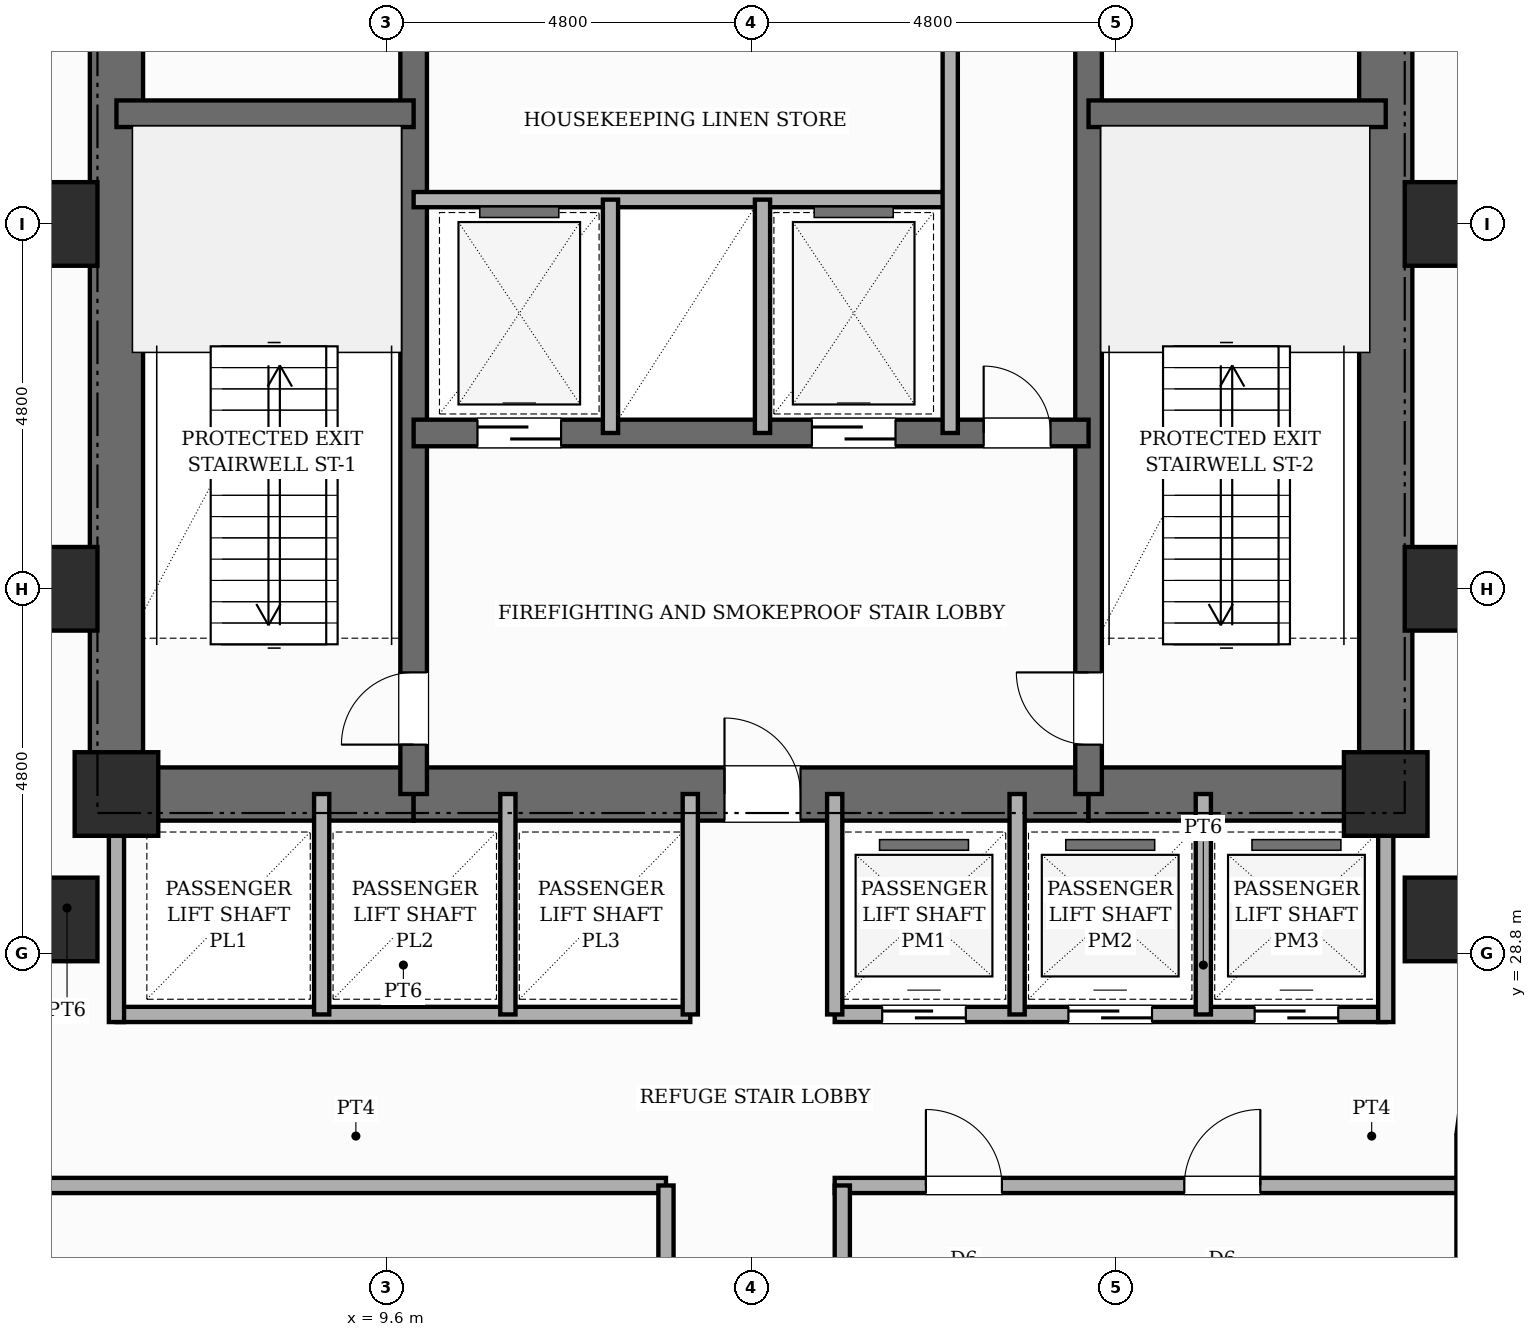
"""IFC4 building model, lengths in metres.
Left out: names, types, materials, properties, quantities, classifications, styles, units other than length and angle.
Written with IfcOpenShell. Run it as: python <this file> out.ifc"""

import sys

from ifc_helpers import new_model, si_unit, direction, frame, frame_2d, origin, origin_2d, place, context, subcontext, project, spatial, rectangle, extrude, element, fill, save


model = new_model("IFC4")
c1 = context("Model", 3, precision=1e-05, world=origin(), true_north=direction((0.0, 1.0)))
c2 = subcontext(c1, "Body", "Model", "MODEL_VIEW")
j1 = project(units=[si_unit("LENGTHUNIT", "METRE"), si_unit("PLANEANGLEUNIT", "RADIAN")], contexts=[c1])
p1 = place(None, origin())
s1 = spatial("IfcSite", under=j1, at=p1, CompositionType="ELEMENT")
p2 = place(p1, origin())
s2 = spatial("IfcBuilding", under=s1, at=p2, CompositionType="ELEMENT")
p3 = place(p2, frame((0.0, 0.0, 101.8)))
s3 = spatial("IfcBuildingStorey", under=s2, at=p3, CompositionType="ELEMENT", Elevation=101.8)
p4 = place(p3, frame((6.05, 30.55, 0.0), z_axis=(0.0, 0.0, 1.0), x_axis=(0.0, 1.0, 0.0)))
e1 = element("IfcWall", 1, at=p4, inside=s3, PredefinedType="SHEAR", context=c2, shape_type="SweptSolid", body=[
    extrude(rectangle(XDim=15.6, YDim=0.7, at=frame_2d((7.8, 0.0))), origin(), (0.0, 0.0, 1.0), 5.4),
])
p5 = place(p3, frame((22.75, 30.55, 0.0), z_axis=(0.0, 0.0, 1.0), x_axis=(0.0, 1.0, 0.0)))
e2 = element("IfcWall", 2, at=p5, inside=s3, PredefinedType="SHEAR", context=c2, shape_type="SweptSolid", body=[
    extrude(rectangle(XDim=15.6, YDim=0.7, at=frame_2d((7.8, 0.0))), origin(), (0.0, 0.0, 1.0), 5.4),
])
p6 = place(p5, frame((10.8, 0.0, 0.0)))
e3 = element("IfcOpeningElement", 3, at=p6, cuts=e2, PredefinedType="OPENING", context=c2, shape_type="SweptSolid", body=[
    extrude(rectangle(XDim=1.0, YDim=2.15, at=frame_2d((0.5, 1.075))), frame((0.0, 0.36, 0.0), z_axis=(0.0, -1.0, 0.0), x_axis=(1.0, 0.0, 0.0)), (0.0, 0.0, 1.0), 0.72),
])
p7 = place(p3, frame((6.05, 30.9, 0.0), z_axis=(0.0, 0.0, 1.0), x_axis=(1.0, 0.0, 0.0)))
e4 = element("IfcWall", 4, at=p7, inside=s3, PredefinedType="SHEAR", context=c2, shape_type="SweptSolid", body=[
    extrude(rectangle(XDim=3.91, YDim=0.7, at=frame_2d((1.955, 0.0))), origin(), (0.0, 0.0, 1.0), 5.4),
])
p8 = place(p3, frame((9.96, 30.9, 0.0), z_axis=(0.0, 0.0, 1.0), x_axis=(1.0, 0.0, 0.0)))
e5 = element("IfcWall", 5, at=p8, inside=s3, PredefinedType="SHEAR", context=c2, shape_type="SweptSolid", body=[
    extrude(rectangle(XDim=8.88, YDim=0.7, at=frame_2d((4.44, 0.0))), origin(), (0.0, 0.0, 1.0), 5.4),
])
p9 = place(p8, frame((4.09, 0.0, 0.0)))
e6 = element("IfcOpeningElement", 6, at=p9, cuts=e5, PredefinedType="OPENING", context=c2, shape_type="SweptSolid", body=[
    extrude(rectangle(XDim=1.0, YDim=2.15, at=frame_2d((0.5, 1.075))), frame((0.0, 0.36, 0.0), z_axis=(0.0, -1.0, 0.0), x_axis=(1.0, 0.0, 0.0)), (0.0, 0.0, 1.0), 0.72),
])
p10 = place(p3, frame((18.84, 30.9, 0.0), z_axis=(0.0, 0.0, 1.0), x_axis=(1.0, 0.0, 0.0)))
e7 = element("IfcWall", 7, at=p10, inside=s3, PredefinedType="SHEAR", context=c2, shape_type="SweptSolid", body=[
    extrude(rectangle(XDim=3.91, YDim=0.7, at=frame_2d((1.955, 0.0))), origin(), (0.0, 0.0, 1.0), 5.4),
])
p11 = place(p3, frame((9.96, 30.9, 0.0), z_axis=(0.0, 0.0, 1.0), x_axis=(0.0, 1.0, 0.0)))
e8 = element("IfcWall", 8, at=p11, inside=s3, PredefinedType="SHEAR", context=c2, shape_type="SweptSolid", body=[
    extrude(rectangle(XDim=14.9, YDim=0.35, at=frame_2d((7.45, 0.0))), origin(), (0.0, 0.0, 1.0), 5.4),
])
p12 = place(p11, frame((0.65, 0.0, 0.0)))
e9 = element("IfcOpeningElement", 9, at=p12, cuts=e8, PredefinedType="OPENING", context=c2, shape_type="SweptSolid", body=[
    extrude(rectangle(XDim=0.95, YDim=2.1, at=frame_2d((0.475, 1.05))), frame((0.0, 0.185, 0.0), z_axis=(0.0, -1.0, 0.0), x_axis=(1.0, 0.0, 0.0)), (0.0, 0.0, 1.0), 0.37),
])
p13 = place(p11, frame((10.45, 0.0, 0.0)))
e10 = element("IfcOpeningElement", 10, at=p13, cuts=e8, PredefinedType="OPENING", context=c2, shape_type="SweptSolid", body=[
    extrude(rectangle(XDim=1.0, YDim=2.15, at=frame_2d((0.5, 1.075))), frame((0.0, 0.185, 0.0), z_axis=(0.0, -1.0, 0.0), x_axis=(1.0, 0.0, 0.0)), (0.0, 0.0, 1.0), 0.37),
])
p14 = place(p3, frame((18.84, 30.9, 0.0), z_axis=(0.0, 0.0, 1.0), x_axis=(0.0, 1.0, 0.0)))
e11 = element("IfcWall", 11, at=p14, inside=s3, PredefinedType="SHEAR", context=c2, shape_type="SweptSolid", body=[
    extrude(rectangle(XDim=14.9, YDim=0.35, at=frame_2d((7.45, 0.0))), origin(), (0.0, 0.0, 1.0), 5.4),
])
p15 = place(p14, frame((0.65, 0.0, 0.0)))
e12 = element("IfcOpeningElement", 12, at=p15, cuts=e11, PredefinedType="OPENING", context=c2, shape_type="SweptSolid", body=[
    extrude(rectangle(XDim=0.95, YDim=2.1, at=frame_2d((0.475, 1.05))), frame((0.0, 0.185, 0.0), z_axis=(0.0, -1.0, 0.0), x_axis=(1.0, 0.0, 0.0)), (0.0, 0.0, 1.0), 0.37),
])
p16 = place(p14, frame((10.45, 0.0, 0.0)))
e13 = element("IfcOpeningElement", 13, at=p16, cuts=e11, PredefinedType="OPENING", context=c2, shape_type="SweptSolid", body=[
    extrude(rectangle(XDim=1.0, YDim=2.15, at=frame_2d((0.5, 1.075))), frame((0.0, 0.185, 0.0), z_axis=(0.0, -1.0, 0.0), x_axis=(1.0, 0.0, 0.0)), (0.0, 0.0, 1.0), 0.37),
])
for number, where, z_axis, x_axis in (
    (14, (6.05, 39.85, 0.0), (0.0, 0.0, 1.0), (1.0, 0.0, 0.0)),
    (15, (18.84, 39.85, 0.0), (0.0, 0.0, 1.0), (1.0, 0.0, 0.0)),
):
    element("IfcWall", number, at=place(p3, frame(where, z_axis=z_axis, x_axis=x_axis)), inside=s3, PredefinedType="SHEAR", context=c2, shape_type="SweptSolid", body=[
        extrude(rectangle(XDim=3.91, YDim=0.35, at=frame_2d((1.955, 0.0))), origin(), (0.0, 0.0, 1.0), 5.4),
    ])
p17 = place(p3, frame((9.96, 35.65, 0.0), z_axis=(0.0, 0.0, 1.0), x_axis=(1.0, 0.0, 0.0)))
e16 = element("IfcWall", 16, at=p17, inside=s3, PredefinedType="SHEAR", context=c2, shape_type="SweptSolid", body=[
    extrude(rectangle(XDim=8.88, YDim=0.35, at=frame_2d((4.44, 0.0))), origin(), (0.0, 0.0, 1.0), 5.4),
])
p18 = place(p17, frame((0.84, 0.0, 0.0)))
e17 = element("IfcOpeningElement", 17, at=p18, cuts=e16, PredefinedType="OPENING", context=c2, shape_type="SweptSolid", body=[
    extrude(rectangle(XDim=1.1, YDim=2.15, at=frame_2d((0.55, 1.075))), frame((0.0, 0.185, 0.0), z_axis=(0.0, -1.0, 0.0), x_axis=(1.0, 0.0, 0.0)), (0.0, 0.0, 1.0), 0.37),
])
p19 = place(p17, frame((5.24, 0.0, 0.0)))
e18 = element("IfcOpeningElement", 18, at=p19, cuts=e16, PredefinedType="OPENING", context=c2, shape_type="SweptSolid", body=[
    extrude(rectangle(XDim=1.1, YDim=2.15, at=frame_2d((0.55, 1.075))), frame((0.0, 0.185, 0.0), z_axis=(0.0, -1.0, 0.0), x_axis=(1.0, 0.0, 0.0)), (0.0, 0.0, 1.0), 0.37),
])
p20 = place(p17, frame((7.5, 0.0, 0.0)))
e19 = element("IfcOpeningElement", 19, at=p20, cuts=e16, PredefinedType="OPENING", context=c2, shape_type="SweptSolid", body=[
    extrude(rectangle(XDim=0.88, YDim=2.1, at=frame_2d((0.44, 1.05))), frame((0.0, 0.185, 0.0), z_axis=(0.0, -1.0, 0.0), x_axis=(1.0, 0.0, 0.0)), (0.0, 0.0, 1.0), 0.37),
])
for number, where, z_axis, x_axis in (
    (20, (5.25, 29.25, 0.0), (0.0, 0.0, 1.0), (1.0, 0.0, 0.0)),
    (21, (5.25, 33.6, 0.0), (0.0, 0.0, 1.0), (1.0, 0.0, 0.0)),
    (22, (5.25, 38.4, 0.0), (0.0, 0.0, 1.0), (1.0, 0.0, 0.0)),
    (23, (6.05, 30.9, 0.0), (0.0, 0.0, 1.0), (1.0, 0.0, 0.0)),
    (24, (22.75, 30.9, 0.0), (0.0, 0.0, 1.0), (1.0, 0.0, 0.0)),
    (25, (23.55, 29.25, 0.0), (0.0, 0.0, 1.0), (1.0, 0.0, 0.0)),
    (26, (23.55, 33.6, 0.0), (0.0, 0.0, 1.0), (1.0, 0.0, 0.0)),
    (27, (23.55, 38.4, 0.0), (0.0, 0.0, 1.0), (1.0, 0.0, 0.0)),
):
    element("IfcColumn", number, at=place(p3, frame(where, z_axis=z_axis, x_axis=x_axis)), inside=s3, PredefinedType="COLUMN", context=c2, shape_type="SweptSolid", body=[
        extrude(rectangle(XDim=1.1, YDim=1.1, at=origin_2d()), origin(), (0.0, 0.0, 1.0), 5.4),
    ])
p21 = place(p3, frame((23.923, 27.042, 0.0), z_axis=(0.0, 0.0, 1.0), x_axis=(-0.130555323746, -0.9914410257, 0.0)))
e28 = element("IfcWall", 28, at=p21, inside=s3, PredefinedType="STANDARD", context=c2, shape_type="SweptSolid", body=[
    extrude(rectangle(XDim=0.626, YDim=0.32, at=frame_2d((0.313, 0.0))), origin(), (0.0, 0.0, 1.0), 4.34),
])
p22 = place(p3, frame((23.84, 26.4, 0.0), z_axis=(0.0, 0.0, 1.0), x_axis=(0.0, -1.0, 0.0)))
e29 = element("IfcWall", 29, at=p22, inside=s3, PredefinedType="STANDARD", context=c2, shape_type="SweptSolid", body=[
    extrude(rectangle(XDim=14.4, YDim=0.32, at=frame_2d((7.2, 0.0))), origin(), (0.0, 0.0, 1.0), 4.34),
])
p23 = place(p3, frame((9.96, 38.72, 0.0), z_axis=(0.0, 0.0, 1.0), x_axis=(1.0, 0.0, 0.0)))
e30 = element("IfcWall", 30, at=p23, inside=s3, PredefinedType="POLYGONAL", context=c2, shape_type="SweptSolid", body=[
    extrude(rectangle(XDim=7.06, YDim=0.2, at=frame_2d((3.53, 0.0))), origin(), (0.0, 0.0, 1.0), 5.16),
])
for number, where, z_axis, x_axis in (
    (31, (12.55, 35.65, 0.0), (0.0, 0.0, 1.0), (0.0, 1.0, 0.0)),
    (32, (14.55, 35.65, 0.0), (0.0, 0.0, 1.0), (0.0, 1.0, 0.0)),
):
    element("IfcWall", number, at=place(p3, frame(where, z_axis=z_axis, x_axis=x_axis)), inside=s3, PredefinedType="POLYGONAL", context=c2, shape_type="SweptSolid", body=[
        extrude(rectangle(XDim=3.07, YDim=0.2, at=frame_2d((1.535, 0.0))), origin(), (0.0, 0.0, 1.0), 5.16),
    ])
p24 = place(p3, frame((17.02, 35.65, 0.0), z_axis=(0.0, 0.0, 1.0), x_axis=(0.0, 1.0, 0.0)))
e33 = element("IfcWall", 33, at=p24, inside=s3, PredefinedType="POLYGONAL", context=c2, shape_type="SweptSolid", body=[
    extrude(rectangle(XDim=5.15, YDim=0.2, at=frame_2d((2.575, 0.0))), origin(), (0.0, 0.0, 1.0), 5.16),
])
p25 = place(p3, frame((6.05, 28.0, 0.0), z_axis=(0.0, 0.0, 1.0), x_axis=(1.0, 0.0, 0.0)))
e34 = element("IfcWall", 34, at=p25, inside=s3, PredefinedType="POLYGONAL", context=c2, shape_type="SweptSolid", body=[
    extrude(rectangle(XDim=7.55, YDim=0.2, at=frame_2d((3.775, 0.0))), origin(), (0.0, 0.0, 1.0), 5.16),
])
p26 = place(p3, frame((15.5, 28.0, 0.0), z_axis=(0.0, 0.0, 1.0), x_axis=(1.0, 0.0, 0.0)))
e35 = element("IfcWall", 35, at=p26, inside=s3, PredefinedType="POLYGONAL", context=c2, shape_type="SweptSolid", body=[
    extrude(rectangle(XDim=7.25, YDim=0.2, at=frame_2d((3.625, 0.0))), origin(), (0.0, 0.0, 1.0), 5.16),
])
p27 = place(p26, frame((0.625, 0.0, 0.0)))
e36 = element("IfcOpeningElement", 36, at=p27, cuts=e35, PredefinedType="OPENING", context=c2, shape_type="SweptSolid", body=[
    extrude(rectangle(XDim=1.1, YDim=2.15, at=frame_2d((0.55, 1.075))), frame((0.0, 0.11, 0.0), z_axis=(0.0, -1.0, 0.0), x_axis=(1.0, 0.0, 0.0)), (0.0, 0.0, 1.0), 0.22),
])
p28 = place(p26, frame((3.075, 0.0, 0.0)))
e37 = element("IfcOpeningElement", 37, at=p28, cuts=e35, PredefinedType="OPENING", context=c2, shape_type="SweptSolid", body=[
    extrude(rectangle(XDim=1.1, YDim=2.15, at=frame_2d((0.55, 1.075))), frame((0.0, 0.11, 0.0), z_axis=(0.0, -1.0, 0.0), x_axis=(1.0, 0.0, 0.0)), (0.0, 0.0, 1.0), 0.22),
])
p29 = place(p26, frame((5.525, 0.0, 0.0)))
e38 = element("IfcOpeningElement", 38, at=p29, cuts=e35, PredefinedType="OPENING", context=c2, shape_type="SweptSolid", body=[
    extrude(rectangle(XDim=1.1, YDim=2.15, at=frame_2d((0.55, 1.075))), frame((0.0, 0.11, 0.0), z_axis=(0.0, -1.0, 0.0), x_axis=(1.0, 0.0, 0.0)), (0.0, 0.0, 1.0), 0.22),
])
for number, where, z_axis, x_axis in (
    (39, (6.05, 27.9, 0.0), (0.0, 0.0, 1.0), (0.0, 1.0, 0.0)),
    (40, (22.75, 27.9, 0.0), (0.0, 0.0, 1.0), (0.0, 1.0, 0.0)),
):
    element("IfcWall", number, at=place(p3, frame(where, z_axis=z_axis, x_axis=x_axis)), inside=s3, PredefinedType="POLYGONAL", context=c2, shape_type="SweptSolid", body=[
        extrude(rectangle(XDim=3.0, YDim=0.2, at=frame_2d((1.5, 0.0))), origin(), (0.0, 0.0, 1.0), 5.16),
    ])
for number, where, z_axis, x_axis in (
    (41, (13.6, 28.0, 0.0), (0.0, 0.0, 1.0), (0.0, 1.0, 0.0)),
    (42, (15.5, 28.0, 0.0), (0.0, 0.0, 1.0), (0.0, 1.0, 0.0)),
    (43, (8.75, 28.0, 0.0), (0.0, 0.0, 1.0), (0.0, 1.0, 0.0)),
    (44, (11.2, 28.0, 0.0), (0.0, 0.0, 1.0), (0.0, 1.0, 0.0)),
    (45, (17.9, 28.0, 0.0), (0.0, 0.0, 1.0), (0.0, 1.0, 0.0)),
    (46, (20.35, 28.0, 0.0), (0.0, 0.0, 1.0), (0.0, 1.0, 0.0)),
):
    element("IfcWall", number, at=place(p3, frame(where, z_axis=z_axis, x_axis=x_axis)), inside=s3, PredefinedType="POLYGONAL", context=c2, shape_type="SweptSolid", body=[
        extrude(rectangle(XDim=2.9, YDim=0.2, at=frame_2d((1.45, 0.0))), origin(), (0.0, 0.0, 1.0), 5.16),
    ])
p30 = place(p3, frame((15.5, 25.75, 0.0), z_axis=(0.0, 0.0, 1.0), x_axis=(1.0, 0.0, 0.0)))
e47 = element("IfcWall", 47, at=p30, inside=s3, PredefinedType="PARTITIONING", context=c2, shape_type="SweptSolid", body=[
    extrude(rectangle(XDim=8.18, YDim=0.2, at=frame_2d((4.09, 0.0))), origin(), (0.0, 0.0, 1.0), 5.16),
])
p31 = place(p30, frame((1.2, 0.0, 0.0)))
e48 = element("IfcOpeningElement", 48, at=p31, cuts=e47, PredefinedType="OPENING", context=c2, shape_type="SweptSolid", body=[
    extrude(rectangle(XDim=1.0, YDim=2.15, at=frame_2d((0.5, 1.075))), frame((0.0, 0.11, 0.0), z_axis=(0.0, -1.0, 0.0), x_axis=(1.0, 0.0, 0.0)), (0.0, 0.0, 1.0), 0.22),
])
p32 = place(p30, frame((4.6, 0.0, 0.0)))
e49 = element("IfcOpeningElement", 49, at=p32, cuts=e47, PredefinedType="OPENING", context=c2, shape_type="SweptSolid", body=[
    extrude(rectangle(XDim=1.0, YDim=2.15, at=frame_2d((0.5, 1.075))), frame((0.0, 0.11, 0.0), z_axis=(0.0, -1.0, 0.0), x_axis=(1.0, 0.0, 0.0)), (0.0, 0.0, 1.0), 0.22),
])
p33 = place(p3, frame((5.12, 25.75, 0.0), z_axis=(0.0, 0.0, 1.0), x_axis=(1.0, 0.0, 0.0)))
e50 = element("IfcWall", 50, at=p33, inside=s3, PredefinedType="PARTITIONING", context=c2, shape_type="SweptSolid", body=[
    extrude(rectangle(XDim=8.16, YDim=0.2, at=frame_2d((4.08, 0.0))), origin(), (0.0, 0.0, 1.0), 5.16),
])
p34 = place(p3, frame((13.28, 15.08, 0.0), z_axis=(0.0, 0.0, 1.0), x_axis=(0.0, 1.0, 0.0)))
e51 = element("IfcWall", 51, at=p34, inside=s3, PredefinedType="PARTITIONING", context=c2, shape_type="SweptSolid", body=[
    extrude(rectangle(XDim=10.67, YDim=0.2, at=frame_2d((5.335, 0.0))), origin(), (0.0, 0.0, 1.0), 5.16),
])
p35 = place(p34, frame((1.4, 0.0, 0.0)))
e52 = element("IfcOpeningElement", 52, at=p35, cuts=e51, PredefinedType="OPENING", context=c2, shape_type="SweptSolid", body=[
    extrude(rectangle(XDim=1.0, YDim=2.15, at=frame_2d((0.5, 1.075))), frame((0.0, 0.11, 0.0), z_axis=(0.0, -1.0, 0.0), x_axis=(1.0, 0.0, 0.0)), (0.0, 0.0, 1.0), 0.22),
])
p36 = place(p34, frame((5.8, 0.0, 0.0)))
e53 = element("IfcOpeningElement", 53, at=p36, cuts=e51, PredefinedType="OPENING", context=c2, shape_type="SweptSolid", body=[
    extrude(rectangle(XDim=1.0, YDim=2.15, at=frame_2d((0.5, 1.075))), frame((0.0, 0.11, 0.0), z_axis=(0.0, -1.0, 0.0), x_axis=(1.0, 0.0, 0.0)), (0.0, 0.0, 1.0), 0.22),
])
p37 = place(p3, frame((15.6, 14.38, 0.0), z_axis=(0.0, 0.0, 1.0), x_axis=(0.0, 1.0, 0.0)))
e54 = element("IfcWall", 54, at=p37, inside=s3, PredefinedType="PARTITIONING", context=c2, shape_type="SweptSolid", body=[
    extrude(rectangle(XDim=11.37, YDim=0.2, at=frame_2d((5.685, 0.0))), origin(), (0.0, 0.0, 1.0), 5.16),
])
p38 = place(p12, origin())
e55 = element("IfcDoor", 55, at=p38, inside=s3, OperationType="SINGLE_SWING_LEFT", PredefinedType="DOOR", context=c2, shape_type="SweptSolid", body=[
    extrude(rectangle(XDim=0.95, YDim=2.1, at=frame_2d((0.475, 1.05))), frame((0.0, 0.025, 0.0), z_axis=(0.0, -1.0, 0.0), x_axis=(1.0, 0.0, 0.0)), (0.0, 0.0, 1.0), 0.05),
])
fill(e9, e55)
p39 = place(p15, origin())
e56 = element("IfcDoor", 56, at=p39, inside=s3, OperationType="SINGLE_SWING_RIGHT", PredefinedType="DOOR", context=c2, shape_type="SweptSolid", body=[
    extrude(rectangle(XDim=0.95, YDim=2.1, at=frame_2d((0.475, 1.05))), frame((0.0, 0.025, 0.0), z_axis=(0.0, -1.0, 0.0), x_axis=(1.0, 0.0, 0.0)), (0.0, 0.0, 1.0), 0.05),
])
fill(e12, e56)
p40 = place(p9, origin())
e57 = element("IfcDoor", 57, at=p40, inside=s3, OperationType="SINGLE_SWING_LEFT", PredefinedType="DOOR", context=c2, shape_type="SweptSolid", body=[
    extrude(rectangle(XDim=1.0, YDim=2.15, at=frame_2d((0.5, 1.075))), frame((0.0, 0.025, 0.0), z_axis=(0.0, -1.0, 0.0), x_axis=(1.0, 0.0, 0.0)), (0.0, 0.0, 1.0), 0.05),
])
fill(e6, e57)
p41 = place(p18, origin())
e58 = element("IfcDoor", 58, at=p41, inside=s3, OperationType="SLIDING_TO_LEFT", PredefinedType="DOOR", context=c2, shape_type="SweptSolid", body=[
    extrude(rectangle(XDim=1.1, YDim=2.15, at=frame_2d((0.55, 1.075))), frame((0.0, 0.025, 0.0), z_axis=(0.0, -1.0, 0.0), x_axis=(1.0, 0.0, 0.0)), (0.0, 0.0, 1.0), 0.05),
])
fill(e17, e58)
p42 = place(p19, origin())
e59 = element("IfcDoor", 59, at=p42, inside=s3, OperationType="SLIDING_TO_RIGHT", PredefinedType="DOOR", context=c2, shape_type="SweptSolid", body=[
    extrude(rectangle(XDim=1.1, YDim=2.15, at=frame_2d((0.55, 1.075))), frame((0.0, 0.025, 0.0), z_axis=(0.0, -1.0, 0.0), x_axis=(1.0, 0.0, 0.0)), (0.0, 0.0, 1.0), 0.05),
])
fill(e18, e59)
p43 = place(p20, origin())
e60 = element("IfcDoor", 60, at=p43, inside=s3, OperationType="SINGLE_SWING_LEFT", PredefinedType="DOOR", context=c2, shape_type="SweptSolid", body=[
    extrude(rectangle(XDim=0.88, YDim=2.1, at=frame_2d((0.44, 1.05))), frame((0.0, 0.025, 0.0), z_axis=(0.0, -1.0, 0.0), x_axis=(1.0, 0.0, 0.0)), (0.0, 0.0, 1.0), 0.05),
])
fill(e19, e60)
p44 = place(p27, origin())
e61 = element("IfcDoor", 61, at=p44, inside=s3, OperationType="SLIDING_TO_RIGHT", PredefinedType="DOOR", context=c2, shape_type="SweptSolid", body=[
    extrude(rectangle(XDim=1.1, YDim=2.15, at=frame_2d((0.55, 1.075))), frame((0.0, 0.025, 0.0), z_axis=(0.0, -1.0, 0.0), x_axis=(1.0, 0.0, 0.0)), (0.0, 0.0, 1.0), 0.05),
])
fill(e36, e61)
p45 = place(p28, origin())
e62 = element("IfcDoor", 62, at=p45, inside=s3, OperationType="SLIDING_TO_LEFT", PredefinedType="DOOR", context=c2, shape_type="SweptSolid", body=[
    extrude(rectangle(XDim=1.1, YDim=2.15, at=frame_2d((0.55, 1.075))), frame((0.0, 0.025, 0.0), z_axis=(0.0, -1.0, 0.0), x_axis=(1.0, 0.0, 0.0)), (0.0, 0.0, 1.0), 0.05),
])
fill(e37, e62)
p46 = place(p29, origin())
e63 = element("IfcDoor", 63, at=p46, inside=s3, OperationType="SLIDING_TO_RIGHT", PredefinedType="DOOR", context=c2, shape_type="SweptSolid", body=[
    extrude(rectangle(XDim=1.1, YDim=2.15, at=frame_2d((0.55, 1.075))), frame((0.0, 0.025, 0.0), z_axis=(0.0, -1.0, 0.0), x_axis=(1.0, 0.0, 0.0)), (0.0, 0.0, 1.0), 0.05),
])
fill(e38, e63)
p47 = place(p31, origin())
e64 = element("IfcDoor", 64, at=p47, inside=s3, OperationType="SINGLE_SWING_LEFT", PredefinedType="DOOR", context=c2, shape_type="SweptSolid", body=[
    extrude(rectangle(XDim=1.0, YDim=2.15, at=frame_2d((0.5, 1.075))), frame((0.0, 0.025, 0.0), z_axis=(0.0, -1.0, 0.0), x_axis=(1.0, 0.0, 0.0)), (0.0, 0.0, 1.0), 0.05),
])
fill(e48, e64)
p48 = place(p32, origin())
e65 = element("IfcDoor", 65, at=p48, inside=s3, OperationType="SINGLE_SWING_RIGHT", PredefinedType="DOOR", context=c2, shape_type="SweptSolid", body=[
    extrude(rectangle(XDim=1.0, YDim=2.15, at=frame_2d((0.5, 1.075))), frame((0.0, 0.025, 0.0), z_axis=(0.0, -1.0, 0.0), x_axis=(1.0, 0.0, 0.0)), (0.0, 0.0, 1.0), 0.05),
])
fill(e49, e65)
save(model, sys.argv[1])
